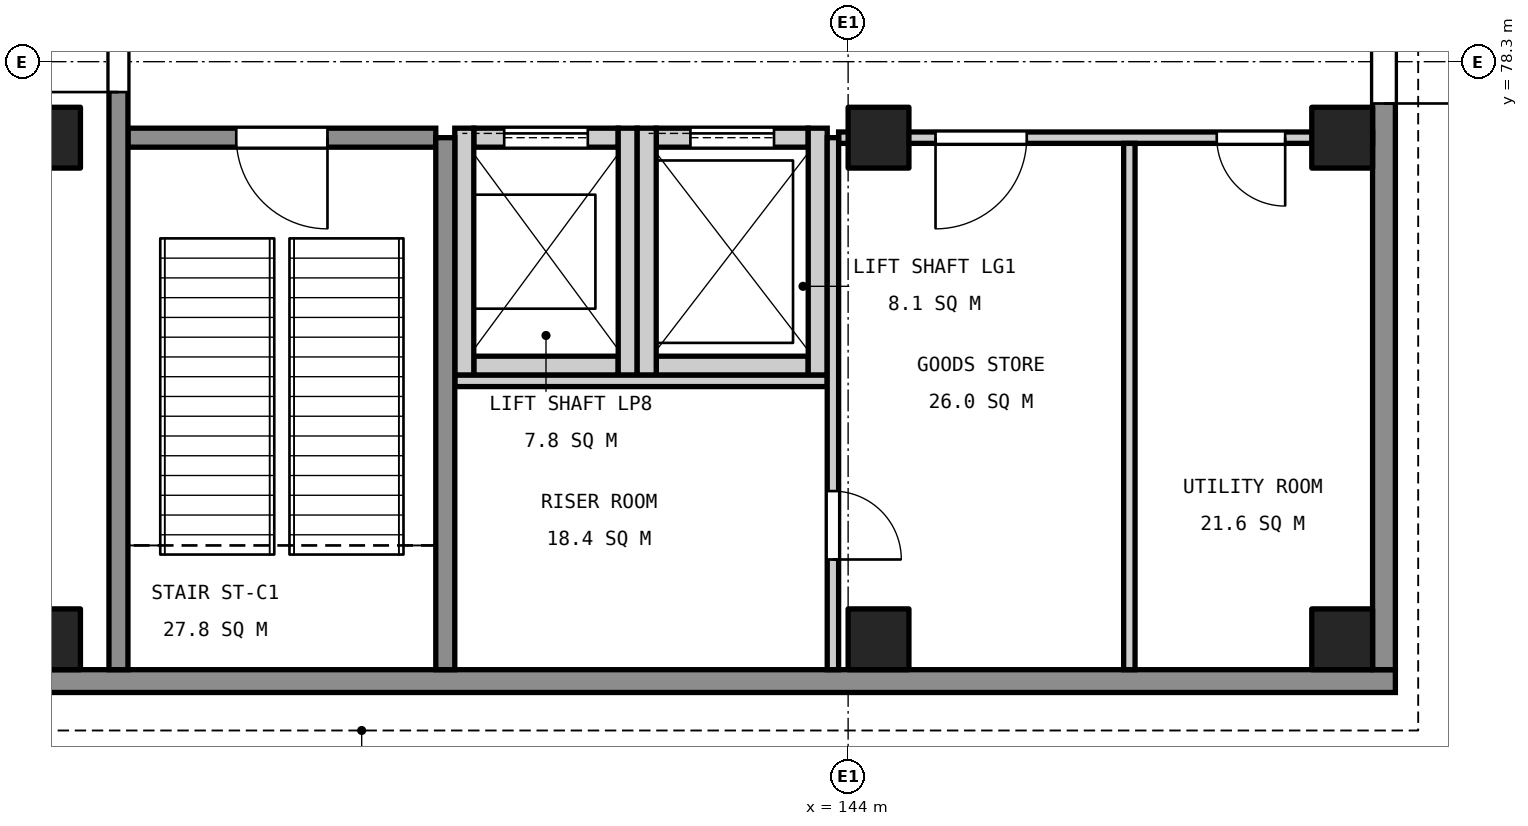
"""IFC4 building model, lengths in metres.
Left out: names, types, materials, properties, quantities, classifications, styles, units other than length and angle.
Written with IfcOpenShell. Run it as: python <this file> out.ifc"""

import sys

from ifc_helpers import new_model, si_unit, direction, frame, frame_2d, origin, origin_2d, place, context, subcontext, project, spatial, rectangle, extrude, element, fill, save


model = new_model("IFC4")
c1 = context("Model", 3, precision=1e-05, world=origin(), true_north=direction((0.0, 1.0)))
c2 = subcontext(c1, "Body", "Model", "MODEL_VIEW")
j1 = project(units=[si_unit("LENGTHUNIT", "METRE"), si_unit("PLANEANGLEUNIT", "RADIAN")], contexts=[c1])
p1 = place(None, origin())
s1 = spatial("IfcSite", under=j1, at=p1, CompositionType="ELEMENT")
p2 = place(p1, origin())
s2 = spatial("IfcBuilding", under=s1, at=p2, CompositionType="ELEMENT")
p3 = place(p2, origin())
s3 = spatial("IfcBuildingStorey", under=s2, at=p3, CompositionType="ELEMENT", Elevation=0.0)
p4 = place(p3, frame((139.075, 74.3, 0.0), z_axis=(0.0, 0.0, 1.0), x_axis=(1.0, 0.0, 0.0)))
e1 = element("IfcWall", 1, at=p4, inside=s3, PredefinedType="SOLIDWALL", context=c2, shape_type="SweptSolid", body=[
    extrude(rectangle(XDim=1.9, YDim=0.25, at=frame_2d((0.95, 0.0))), origin(), (0.0, 0.0, 1.0), 5.55),
])
p5 = place(p3, frame((139.075, 77.3, 0.0), z_axis=(0.0, 0.0, 1.0), x_axis=(1.0, 0.0, 0.0)))
e2 = element("IfcWall", 2, at=p5, inside=s3, PredefinedType="SOLIDWALL", context=c2, shape_type="SweptSolid", body=[
    extrude(rectangle(XDim=1.9, YDim=0.25, at=frame_2d((0.95, 0.0))), origin(), (0.0, 0.0, 1.0), 5.55),
])
p6 = place(p5, frame((0.4, 0.0, 0.0)))
e3 = element("IfcOpeningElement", 3, at=p6, cuts=e2, PredefinedType="OPENING", context=c2, shape_type="SweptSolid", body=[
    extrude(rectangle(XDim=1.1, YDim=2.1, at=frame_2d((0.55, 1.05))), frame((0.0, 0.135, 0.0), z_axis=(0.0, -1.0, 0.0), x_axis=(1.0, 0.0, 0.0)), (0.0, 0.0, 1.0), 0.27),
])
for number, where, z_axis, x_axis in (
    (4, (138.95, 74.175, 0.0), (0.0, 0.0, 1.0), (0.0, 1.0, 0.0)),
    (5, (141.1, 74.175, 0.0), (0.0, 0.0, 1.0), (0.0, 1.0, 0.0)),
):
    element("IfcWall", number, at=place(p3, frame(where, z_axis=z_axis, x_axis=x_axis)), inside=s3, PredefinedType="SOLIDWALL", context=c2, shape_type="SweptSolid", body=[
        extrude(rectangle(XDim=3.25, YDim=0.25, at=frame_2d((1.625, 0.0))), origin(), (0.0, 0.0, 1.0), 5.55),
    ])
p7 = place(p3, frame((141.475, 74.3, 0.0), z_axis=(0.0, 0.0, 1.0), x_axis=(1.0, 0.0, 0.0)))
e6 = element("IfcWall", 6, at=p7, inside=s3, PredefinedType="SOLIDWALL", context=c2, shape_type="SweptSolid", body=[
    extrude(rectangle(XDim=2.0, YDim=0.25, at=frame_2d((1.0, 0.0))), origin(), (0.0, 0.0, 1.0), 5.55),
])
p8 = place(p3, frame((141.475, 77.3, 0.0), z_axis=(0.0, 0.0, 1.0), x_axis=(1.0, 0.0, 0.0)))
e7 = element("IfcWall", 7, at=p8, inside=s3, PredefinedType="SOLIDWALL", context=c2, shape_type="SweptSolid", body=[
    extrude(rectangle(XDim=2.0, YDim=0.25, at=frame_2d((1.0, 0.0))), origin(), (0.0, 0.0, 1.0), 5.55),
])
p9 = place(p8, frame((0.45, 0.0, 0.0)))
e8 = element("IfcOpeningElement", 8, at=p9, cuts=e7, PredefinedType="OPENING", context=c2, shape_type="SweptSolid", body=[
    extrude(rectangle(XDim=1.1, YDim=2.1, at=frame_2d((0.55, 1.05))), frame((0.0, 0.135, 0.0), z_axis=(0.0, -1.0, 0.0), x_axis=(1.0, 0.0, 0.0)), (0.0, 0.0, 1.0), 0.27),
])
for number, where, z_axis, x_axis in (
    (9, (141.35, 74.175, 0.0), (0.0, 0.0, 1.0), (0.0, 1.0, 0.0)),
    (10, (143.6, 74.175, 0.0), (0.0, 0.0, 1.0), (0.0, 1.0, 0.0)),
):
    element("IfcWall", number, at=place(p3, frame(where, z_axis=z_axis, x_axis=x_axis)), inside=s3, PredefinedType="SOLIDWALL", context=c2, shape_type="SweptSolid", body=[
        extrude(rectangle(XDim=3.25, YDim=0.25, at=frame_2d((1.625, 0.0))), origin(), (0.0, 0.0, 1.0), 5.55),
    ])
for number, where, z_axis, x_axis in (
    (11, (133.5, 70.7, 0.0), (0.0, 0.0, 1.0), (1.0, 0.0, 0.0)),
    (12, (133.5, 77.3, 0.0), (0.0, 0.0, 1.0), (1.0, 0.0, 0.0)),
    (13, (144.4, 70.7, 0.0), (0.0, 0.0, 1.0), (1.0, 0.0, 0.0)),
    (14, (144.4, 77.3, 0.0), (0.0, 0.0, 1.0), (1.0, 0.0, 0.0)),
    (15, (150.5, 70.7, 0.0), (0.0, 0.0, 1.0), (1.0, 0.0, 0.0)),
    (16, (150.5, 77.3, 0.0), (0.0, 0.0, 1.0), (1.0, 0.0, 0.0)),
):
    element("IfcColumn", number, at=place(p3, frame(where, z_axis=z_axis, x_axis=x_axis)), inside=s3, PredefinedType="COLUMN", context=c2, shape_type="SweptSolid", body=[
        extrude(rectangle(XDim=0.8, YDim=0.8, at=origin_2d()), origin(), (0.0, 0.0, 1.0), 6.0),
    ])
p10 = place(p3, frame((124.0, 70.15, 0.0), z_axis=(0.0, 0.0, 1.0), x_axis=(1.0, 0.0, 0.0)))
e17 = element("IfcWall", 17, at=p10, inside=s3, PredefinedType="SOLIDWALL", context=c2, shape_type="SweptSolid", body=[
    extrude(rectangle(XDim=27.2, YDim=0.3, at=frame_2d((13.6, 0.0))), origin(), (0.0, 0.0, 1.0), 5.55),
])
p11 = place(p10, frame((3.55, 0.0, 0.0)))
e18 = element("IfcOpeningElement", 18, at=p11, cuts=e17, PredefinedType="OPENING", context=c2, shape_type="SweptSolid", body=[
    extrude(rectangle(XDim=4.5, YDim=4.5, at=frame_2d((2.25, 2.25))), frame((0.0, 0.16, 0.0), z_axis=(0.0, -1.0, 0.0), x_axis=(1.0, 0.0, 0.0)), (0.0, 0.0, 1.0), 0.32),
])
p12 = place(p3, frame((151.05, 70.3, 0.0), z_axis=(0.0, 0.0, 1.0), x_axis=(0.0, 1.0, 0.0)))
e19 = element("IfcWall", 19, at=p12, inside=s3, PredefinedType="SOLIDWALL", context=c2, shape_type="SweptSolid", body=[
    extrude(rectangle(XDim=12.2, YDim=0.3, at=frame_2d((6.1, 0.0))), origin(), (0.0, 0.0, 1.0), 5.55),
])
p13 = place(p12, frame((7.45, 0.0, 0.0)))
e20 = element("IfcOpeningElement", 20, at=p13, cuts=e19, PredefinedType="OPENING", context=c2, shape_type="SweptSolid", body=[
    extrude(rectangle(XDim=1.5, YDim=2.4, at=frame_2d((0.75, 1.2))), frame((0.0, 0.16, 0.0), z_axis=(0.0, -1.0, 0.0), x_axis=(1.0, 0.0, 0.0)), (0.0, 0.0, 1.0), 0.32),
])
p14 = place(p3, frame((138.825, 74.1, 0.0), z_axis=(0.0, 0.0, 1.0), x_axis=(1.0, 0.0, 0.0)))
e21 = element("IfcWall", 21, at=p14, inside=s3, PredefinedType="SOLIDWALL", context=c2, shape_type="SweptSolid", body=[
    extrude(rectangle(XDim=4.9, YDim=0.15, at=frame_2d((2.45, 0.0))), origin(), (0.0, 0.0, 1.0), 5.55),
])
p15 = place(p3, frame((134.525, 77.3, 0.0), z_axis=(0.0, 0.0, 1.0), x_axis=(1.0, 0.0, 0.0)))
e22 = element("IfcWall", 22, at=p15, inside=s3, PredefinedType="SOLIDWALL", context=c2, shape_type="SweptSolid", body=[
    extrude(rectangle(XDim=4.05, YDim=0.25, at=frame_2d((2.025, 0.0))), origin(), (0.0, 0.0, 1.0), 5.55),
])
p16 = place(p15, frame((1.425, 0.0, 0.0)))
e23 = element("IfcOpeningElement", 23, at=p16, cuts=e22, PredefinedType="OPENING", context=c2, shape_type="SweptSolid", body=[
    extrude(rectangle(XDim=1.2, YDim=2.1, at=frame_2d((0.6, 1.05))), frame((0.0, 0.135, 0.0), z_axis=(0.0, -1.0, 0.0), x_axis=(1.0, 0.0, 0.0)), (0.0, 0.0, 1.0), 0.27),
])
p17 = place(p3, frame((143.875, 77.3, 0.0), z_axis=(0.0, 0.0, 1.0), x_axis=(1.0, 0.0, 0.0)))
e24 = element("IfcWall", 24, at=p17, inside=s3, PredefinedType="SOLIDWALL", context=c2, shape_type="SweptSolid", body=[
    extrude(rectangle(XDim=7.025, YDim=0.15, at=frame_2d((3.512, 0.0))), origin(), (0.0, 0.0, 1.0), 5.55),
])
p18 = place(p17, frame((1.275, 0.0, 0.0)))
e25 = element("IfcOpeningElement", 25, at=p18, cuts=e24, PredefinedType="OPENING", context=c2, shape_type="SweptSolid", body=[
    extrude(rectangle(XDim=1.2, YDim=2.1, at=frame_2d((0.6, 1.05))), frame((0.0, 0.085, 0.0), z_axis=(0.0, -1.0, 0.0), x_axis=(1.0, 0.0, 0.0)), (0.0, 0.0, 1.0), 0.17),
])
p19 = place(p17, frame((4.975, 0.0, 0.0)))
e26 = element("IfcOpeningElement", 26, at=p19, cuts=e24, PredefinedType="OPENING", context=c2, shape_type="SweptSolid", body=[
    extrude(rectangle(XDim=0.9, YDim=2.1, at=frame_2d((0.45, 1.05))), frame((0.0, 0.085, 0.0), z_axis=(0.0, -1.0, 0.0), x_axis=(1.0, 0.0, 0.0)), (0.0, 0.0, 1.0), 0.17),
])
p20 = place(p3, frame((134.4, 70.3, 0.0), z_axis=(0.0, 0.0, 1.0), x_axis=(0.0, 1.0, 0.0)))
e27 = element("IfcWall", 27, at=p20, inside=s3, PredefinedType="SOLIDWALL", context=c2, shape_type="SweptSolid", body=[
    extrude(rectangle(XDim=12.125, YDim=0.25, at=frame_2d((6.062, 0.0))), origin(), (0.0, 0.0, 1.0), 5.55),
])
p21 = place(p20, frame((7.6, 0.0, 0.0)))
e28 = element("IfcOpeningElement", 28, at=p21, cuts=e27, PredefinedType="OPENING", context=c2, shape_type="SweptSolid", body=[
    extrude(rectangle(XDim=1.2, YDim=2.1, at=frame_2d((0.6, 1.05))), frame((0.0, 0.135, 0.0), z_axis=(0.0, -1.0, 0.0), x_axis=(1.0, 0.0, 0.0)), (0.0, 0.0, 1.0), 0.27),
])
p22 = place(p3, frame((138.7, 70.3, 0.0), z_axis=(0.0, 0.0, 1.0), x_axis=(0.0, 1.0, 0.0)))
e29 = element("IfcWall", 29, at=p22, inside=s3, PredefinedType="SOLIDWALL", context=c2, shape_type="SweptSolid", body=[
    extrude(rectangle(XDim=7.0, YDim=0.25, at=frame_2d((3.5, 0.0))), origin(), (0.0, 0.0, 1.0), 5.55),
])
p23 = place(p3, frame((143.8, 70.3, 0.0), z_axis=(0.0, 0.0, 1.0), x_axis=(0.0, 1.0, 0.0)))
e30 = element("IfcWall", 30, at=p23, inside=s3, PredefinedType="SOLIDWALL", context=c2, shape_type="SweptSolid", body=[
    extrude(rectangle(XDim=7.0, YDim=0.15, at=frame_2d((3.5, 0.0))), origin(), (0.0, 0.0, 1.0), 5.55),
])
p24 = place(p23, frame((1.45, 0.0, 0.0)))
e31 = element("IfcOpeningElement", 31, at=p24, cuts=e30, PredefinedType="OPENING", context=c2, shape_type="SweptSolid", body=[
    extrude(rectangle(XDim=0.9, YDim=2.1, at=frame_2d((0.45, 1.05))), frame((0.0, 0.085, 0.0), z_axis=(0.0, -1.0, 0.0), x_axis=(1.0, 0.0, 0.0)), (0.0, 0.0, 1.0), 0.17),
])
p25 = place(p3, frame((147.7, 70.3, 0.0), z_axis=(0.0, 0.0, 1.0), x_axis=(0.0, 1.0, 0.0)))
e32 = element("IfcWall", 32, at=p25, inside=s3, PredefinedType="SOLIDWALL", context=c2, shape_type="SweptSolid", body=[
    extrude(rectangle(XDim=6.925, YDim=0.15, at=frame_2d((3.462, 0.0))), origin(), (0.0, 0.0, 1.0), 5.55),
])
p26 = place(p21, origin())
e33 = element("IfcDoor", 33, at=p26, inside=s3, OperationType="SINGLE_SWING_LEFT", PredefinedType="DOOR", context=c2, shape_type="SweptSolid", body=[
    extrude(rectangle(XDim=1.2, YDim=2.1, at=frame_2d((0.6, 1.05))), frame((0.0, 0.025, 0.0), z_axis=(0.0, -1.0, 0.0), x_axis=(1.0, 0.0, 0.0)), (0.0, 0.0, 1.0), 0.05),
])
fill(e28, e33)
p27 = place(p18, frame((1.2, 0.0, 0.0), z_axis=(0.0, 0.0, 1.0), x_axis=(-1.0, 0.0, 0.0)))
e34 = element("IfcDoor", 34, at=p27, inside=s3, OperationType="SINGLE_SWING_RIGHT", PredefinedType="DOOR", context=c2, shape_type="SweptSolid", body=[
    extrude(rectangle(XDim=1.2, YDim=2.1, at=frame_2d((0.6, 1.05))), frame((0.0, 0.025, 0.0), z_axis=(0.0, -1.0, 0.0), x_axis=(1.0, 0.0, 0.0)), (0.0, 0.0, 1.0), 0.05),
])
fill(e25, e34)
p28 = place(p19, frame((0.9, 0.0, 0.0), z_axis=(0.0, 0.0, 1.0), x_axis=(-1.0, 0.0, 0.0)))
e35 = element("IfcDoor", 35, at=p28, inside=s3, OperationType="SINGLE_SWING_LEFT", PredefinedType="DOOR", context=c2, shape_type="SweptSolid", body=[
    extrude(rectangle(XDim=0.9, YDim=2.1, at=frame_2d((0.45, 1.05))), frame((0.0, 0.025, 0.0), z_axis=(0.0, -1.0, 0.0), x_axis=(1.0, 0.0, 0.0)), (0.0, 0.0, 1.0), 0.05),
])
fill(e26, e35)
p29 = place(p24, frame((0.9, 0.0, 0.0), z_axis=(0.0, 0.0, 1.0), x_axis=(-1.0, 0.0, 0.0)))
e36 = element("IfcDoor", 36, at=p29, inside=s3, OperationType="SINGLE_SWING_RIGHT", PredefinedType="DOOR", context=c2, shape_type="SweptSolid", body=[
    extrude(rectangle(XDim=0.9, YDim=2.1, at=frame_2d((0.45, 1.05))), frame((0.0, 0.025, 0.0), z_axis=(0.0, -1.0, 0.0), x_axis=(1.0, 0.0, 0.0)), (0.0, 0.0, 1.0), 0.05),
])
fill(e31, e36)
p30 = place(p16, frame((1.2, 0.0, 0.0), z_axis=(0.0, 0.0, 1.0), x_axis=(-1.0, 0.0, 0.0)))
e37 = element("IfcDoor", 37, at=p30, inside=s3, OperationType="SINGLE_SWING_LEFT", PredefinedType="DOOR", context=c2, shape_type="SweptSolid", body=[
    extrude(rectangle(XDim=1.2, YDim=2.1, at=frame_2d((0.6, 1.05))), frame((0.0, 0.025, 0.0), z_axis=(0.0, -1.0, 0.0), x_axis=(1.0, 0.0, 0.0)), (0.0, 0.0, 1.0), 0.05),
])
fill(e23, e37)
p31 = place(p6, origin())
e38 = element("IfcDoor", 38, at=p31, inside=s3, OperationType="SLIDING_TO_LEFT", PredefinedType="DOOR", context=c2, shape_type="SweptSolid", body=[
    extrude(rectangle(XDim=1.1, YDim=2.1, at=frame_2d((0.55, 1.05))), frame((0.0, 0.025, 0.0), z_axis=(0.0, -1.0, 0.0), x_axis=(1.0, 0.0, 0.0)), (0.0, 0.0, 1.0), 0.05),
])
fill(e3, e38)
p32 = place(p9, origin())
e39 = element("IfcDoor", 39, at=p32, inside=s3, OperationType="SLIDING_TO_LEFT", PredefinedType="DOOR", context=c2, shape_type="SweptSolid", body=[
    extrude(rectangle(XDim=1.1, YDim=2.1, at=frame_2d((0.55, 1.05))), frame((0.0, 0.025, 0.0), z_axis=(0.0, -1.0, 0.0), x_axis=(1.0, 0.0, 0.0)), (0.0, 0.0, 1.0), 0.05),
])
fill(e8, e39)
p33 = place(p13, frame((1.5, 0.0, 0.0), z_axis=(0.0, 0.0, 1.0), x_axis=(-1.0, 0.0, 0.0)))
e40 = element("IfcDoor", 40, at=p33, inside=s3, OperationType="SINGLE_SWING_RIGHT", PredefinedType="DOOR", context=c2, shape_type="SweptSolid", body=[
    extrude(rectangle(XDim=1.5, YDim=2.4, at=frame_2d((0.75, 1.2))), frame((0.0, 0.025, 0.0), z_axis=(0.0, -1.0, 0.0), x_axis=(1.0, 0.0, 0.0)), (0.0, 0.0, 1.0), 0.05),
])
fill(e20, e40)
save(model, sys.argv[1])
